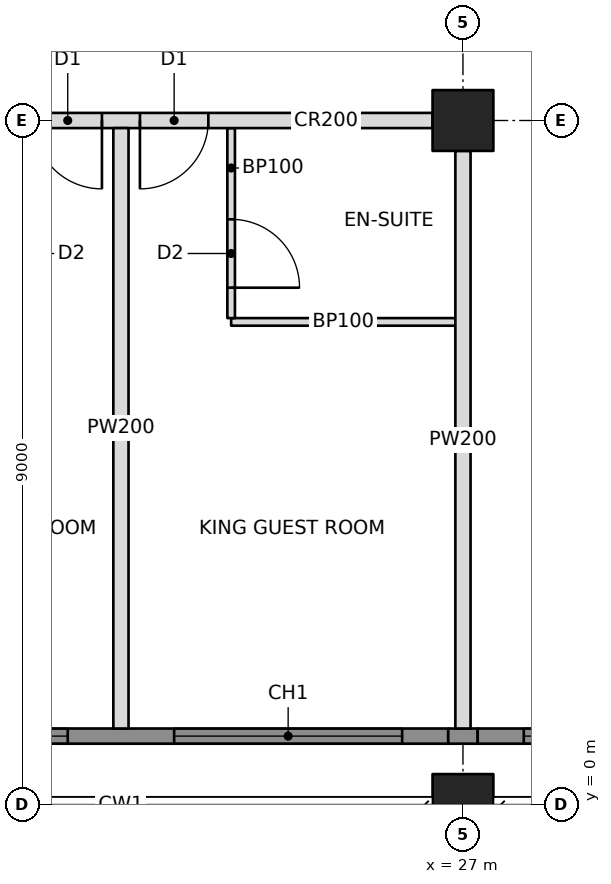
"""IFC4 building model, lengths in metres.
Left out: names, types, materials, properties, quantities, classifications, styles, units other than length and angle.
Written with IfcOpenShell. Run it as: python <this file> out.ifc"""

import sys

from ifc_helpers import new_model, si_unit, direction, frame, frame_2d, origin, origin_2d, place, context, subcontext, project, spatial, rectangle, hollow_rectangle, extrude, element, fill, save


model = new_model("IFC4")
c1 = context("Model", 3, precision=1e-05, world=origin(), true_north=direction((0.0, 1.0)))
c2 = subcontext(c1, "Body", "Model", "MODEL_VIEW")
j1 = project(units=[si_unit("LENGTHUNIT", "METRE"), si_unit("PLANEANGLEUNIT", "RADIAN")], contexts=[c1])
p1 = place(None, origin())
s1 = spatial("IfcSite", under=j1, at=p1, CompositionType="ELEMENT")
p2 = place(p1, origin())
s2 = spatial("IfcBuilding", under=s1, at=p2, CompositionType="ELEMENT")
p3 = place(p2, frame((0.0, 0.0, 170.6)))
s3 = spatial("IfcBuildingStorey", under=s2, at=p3, CompositionType="ELEMENT", Elevation=170.6)
p4 = place(p3, frame((27.0, 0.0, 0.0), z_axis=(0.0, 0.0, 1.0), x_axis=(1.0, 0.0, 0.0)))
e1 = element("IfcColumn", 1, at=p4, inside=s3, PredefinedType="COLUMN", context=c2, shape_type="SweptSolid", body=[
    extrude(hollow_rectangle(XDim=0.8, YDim=0.8, WallThickness=0.07, at=origin_2d()), origin(), (0.0, 0.0, 1.0), 3.4),
])
p5 = place(p3, frame((27.0, 9.0, 0.0), z_axis=(0.0, 0.0, 1.0), x_axis=(1.0, 0.0, 0.0)))
e2 = element("IfcColumn", 2, at=p5, inside=s3, PredefinedType="COLUMN", context=c2, shape_type="SweptSolid", body=[
    extrude(hollow_rectangle(XDim=0.8, YDim=0.8, WallThickness=0.06, at=origin_2d()), origin(), (0.0, 0.0, 1.0), 3.4),
])
p6 = place(p3, frame((18.4, 9.0, 0.0), z_axis=(0.0, 0.0, 1.0), x_axis=(1.0, 0.0, 0.0)))
e3 = element("IfcWall", 3, at=p6, inside=s3, PredefinedType="PARTITIONING", context=c2, shape_type="SweptSolid", body=[
    extrude(rectangle(XDim=8.2, YDim=0.2, at=frame_2d((4.1, 0.0))), origin(), (0.0, 0.0, 1.0), 2.405),
])
p7 = place(p6, frame((2.95, 0.0, 0.0)))
e4 = element("IfcOpeningElement", 4, at=p7, cuts=e3, PredefinedType="OPENING", context=c2, shape_type="SweptSolid", body=[
    extrude(rectangle(XDim=0.9, YDim=2.1, at=frame_2d((0.45, 1.05))), frame((0.0, 0.11, 0.0), z_axis=(0.0, -1.0, 0.0), x_axis=(1.0, 0.0, 0.0)), (0.0, 0.0, 1.0), 0.22),
])
p8 = place(p6, frame((4.35, 0.0, 0.0)))
e5 = element("IfcOpeningElement", 5, at=p8, cuts=e3, PredefinedType="OPENING", context=c2, shape_type="SweptSolid", body=[
    extrude(rectangle(XDim=0.9, YDim=2.1, at=frame_2d((0.45, 1.05))), frame((0.0, 0.11, 0.0), z_axis=(0.0, -1.0, 0.0), x_axis=(1.0, 0.0, 0.0)), (0.0, 0.0, 1.0), 0.22),
])
p9 = place(p3, frame((22.5, 8.9, 0.0), z_axis=(0.0, 0.0, 1.0), x_axis=(0.0, -1.0, 0.0)))
e6 = element("IfcWall", 6, at=p9, inside=s3, PredefinedType="PARTITIONING", context=c2, shape_type="SweptSolid", body=[
    extrude(rectangle(XDim=7.9, YDim=0.2, at=frame_2d((3.95, 0.0))), origin(), (0.0, 0.0, 1.0), 2.404),
])
p10 = place(p3, frame((27.0, 8.6, 0.0), z_axis=(0.0, 0.0, 1.0), x_axis=(0.0, -1.0, 0.0)))
e7 = element("IfcWall", 7, at=p10, inside=s3, PredefinedType="PARTITIONING", context=c2, shape_type="SweptSolid", body=[
    extrude(rectangle(XDim=7.6, YDim=0.2, at=frame_2d((3.8, 0.0))), origin(), (0.0, 0.0, 1.0), 2.405),
])
p11 = place(p3, frame((23.95, 6.35, 0.0), z_axis=(0.0, 0.0, 1.0), x_axis=(1.0, 0.0, 0.0)))
e8 = element("IfcWall", 8, at=p11, inside=s3, PredefinedType="PARTITIONING", context=c2, shape_type="SweptSolid", body=[
    extrude(rectangle(XDim=2.95, YDim=0.1, at=frame_2d((1.475, 0.0))), origin(), (0.0, 0.0, 1.0), 2.404),
])
p12 = place(p3, frame((23.95, 8.9, 0.0), z_axis=(0.0, 0.0, 1.0), x_axis=(0.0, -1.0, 0.0)))
e9 = element("IfcWall", 9, at=p12, inside=s3, PredefinedType="PARTITIONING", context=c2, shape_type="SweptSolid", body=[
    extrude(rectangle(XDim=2.5, YDim=0.1, at=frame_2d((1.25, 0.0))), origin(), (0.0, 0.0, 1.0), 2.404),
])
p13 = place(p12, frame((1.2, 0.0, 0.0)))
e10 = element("IfcOpeningElement", 10, at=p13, cuts=e9, PredefinedType="OPENING", context=c2, shape_type="SweptSolid", body=[
    extrude(rectangle(XDim=0.9, YDim=2.1, at=frame_2d((0.45, 1.05))), frame((0.0, 0.06, 0.0), z_axis=(0.0, -1.0, 0.0), x_axis=(1.0, 0.0, 0.0)), (0.0, 0.0, 1.0), 0.12),
])
p14 = place(p3, frame((18.194, 0.9, 0.0), z_axis=(0.0, 0.0, 1.0), x_axis=(1.0, 0.0, 0.0)))
e11 = element("IfcWall", 11, at=p14, inside=s3, PredefinedType="SOLIDWALL", context=c2, shape_type="SweptSolid", body=[
    extrude(rectangle(XDim=8.612, YDim=0.2, at=frame_2d((4.306, 0.0))), origin(), (0.0, 0.0, 1.0), 3.2),
])
p15 = place(p14, frame((0.606, 0.0, 0.6)))
e12 = element("IfcOpeningElement", 12, at=p15, cuts=e11, PredefinedType="OPENING", context=c2, shape_type="SweptSolid", body=[
    extrude(rectangle(XDim=3.0, YDim=2.2, at=frame_2d((1.5, 1.1))), frame((0.0, 0.11, 0.0), z_axis=(0.0, -1.0, 0.0), x_axis=(1.0, 0.0, 0.0)), (0.0, 0.0, 1.0), 0.22),
])
p16 = place(p14, frame((5.006, 0.0, 0.6)))
e13 = element("IfcOpeningElement", 13, at=p16, cuts=e11, PredefinedType="OPENING", context=c2, shape_type="SweptSolid", body=[
    extrude(rectangle(XDim=3.0, YDim=2.2, at=frame_2d((1.5, 1.1))), frame((0.0, 0.11, 0.0), z_axis=(0.0, -1.0, 0.0), x_axis=(1.0, 0.0, 0.0)), (0.0, 0.0, 1.0), 0.22),
])
p17 = place(p3, frame((26.806, 0.9, 0.0), z_axis=(0.0, 0.0, 1.0), x_axis=(1.0, 0.0, 0.0)))
e14 = element("IfcWall", 14, at=p17, inside=s3, PredefinedType="SOLIDWALL", context=c2, shape_type="SweptSolid", body=[
    extrude(rectangle(XDim=0.388, YDim=0.2, at=frame_2d((0.194, 0.0))), origin(), (0.0, 0.0, 1.0), 2.404),
])
p18 = place(p3, frame((27.194, 0.9, 0.0), z_axis=(0.0, 0.0, 1.0), x_axis=(1.0, 0.0, 0.0)))
e15 = element("IfcWall", 15, at=p18, inside=s3, PredefinedType="SOLIDWALL", context=c2, shape_type="SweptSolid", body=[
    extrude(rectangle(XDim=8.671, YDim=0.2, at=frame_2d((4.335, 0.0))), origin(), (0.0, 0.0, 1.0), 3.2),
])
p19 = place(p18, frame((0.606, 0.0, 0.6)))
e16 = element("IfcOpeningElement", 16, at=p19, cuts=e15, PredefinedType="OPENING", context=c2, shape_type="SweptSolid", body=[
    extrude(rectangle(XDim=3.0, YDim=2.2, at=frame_2d((1.5, 1.1))), frame((0.0, 0.11, 0.0), z_axis=(0.0, -1.0, 0.0), x_axis=(1.0, 0.0, 0.0)), (0.0, 0.0, 1.0), 0.22),
])
p20 = place(p18, frame((5.006, 0.0, 0.6)))
e17 = element("IfcOpeningElement", 17, at=p20, cuts=e15, PredefinedType="OPENING", context=c2, shape_type="SweptSolid", body=[
    extrude(rectangle(XDim=3.0, YDim=2.2, at=frame_2d((1.5, 1.1))), frame((0.0, 0.11, 0.0), z_axis=(0.0, -1.0, 0.0), x_axis=(1.0, 0.0, 0.0)), (0.0, 0.0, 1.0), 0.22),
])
p21 = place(p15, origin())
e18 = element("IfcWindow", 18, at=p21, inside=s3, PartitioningType="TRIPLE_PANEL_VERTICAL", PredefinedType="WINDOW", context=c2, shape_type="SweptSolid", body=[
    extrude(rectangle(XDim=3.0, YDim=2.2, at=frame_2d((1.5, 1.1))), frame((0.0, 0.03, 0.0), z_axis=(0.0, -1.0, 0.0), x_axis=(1.0, 0.0, 0.0)), (0.0, 0.0, 1.0), 0.06),
])
fill(e12, e18)
p22 = place(p16, origin())
e19 = element("IfcWindow", 19, at=p22, inside=s3, PartitioningType="TRIPLE_PANEL_VERTICAL", PredefinedType="WINDOW", context=c2, shape_type="SweptSolid", body=[
    extrude(rectangle(XDim=3.0, YDim=2.2, at=frame_2d((1.5, 1.1))), frame((0.0, 0.03, 0.0), z_axis=(0.0, -1.0, 0.0), x_axis=(1.0, 0.0, 0.0)), (0.0, 0.0, 1.0), 0.06),
])
fill(e13, e19)
p23 = place(p19, origin())
e20 = element("IfcWindow", 20, at=p23, inside=s3, PartitioningType="TRIPLE_PANEL_VERTICAL", PredefinedType="WINDOW", context=c2, shape_type="SweptSolid", body=[
    extrude(rectangle(XDim=3.0, YDim=2.2, at=frame_2d((1.5, 1.1))), frame((0.0, 0.03, 0.0), z_axis=(0.0, -1.0, 0.0), x_axis=(1.0, 0.0, 0.0)), (0.0, 0.0, 1.0), 0.06),
])
fill(e16, e20)
p24 = place(p7, frame((0.9, 0.0, 0.0), z_axis=(0.0, 0.0, 1.0), x_axis=(-1.0, 0.0, 0.0)))
e21 = element("IfcDoor", 21, at=p24, inside=s3, OperationType="SINGLE_SWING_LEFT", PredefinedType="DOOR", context=c2, shape_type="SweptSolid", body=[
    extrude(rectangle(XDim=0.9, YDim=2.1, at=frame_2d((0.45, 1.05))), frame((0.0, 0.025, 0.0), z_axis=(0.0, -1.0, 0.0), x_axis=(1.0, 0.0, 0.0)), (0.0, 0.0, 1.0), 0.05),
])
fill(e4, e21)
p25 = place(p13, origin())
e22 = element("IfcDoor", 22, at=p25, inside=s3, OperationType="SINGLE_SWING_RIGHT", PredefinedType="DOOR", context=c2, shape_type="SweptSolid", body=[
    extrude(rectangle(XDim=0.9, YDim=2.1, at=frame_2d((0.45, 1.05))), frame((0.0, 0.025, 0.0), z_axis=(0.0, -1.0, 0.0), x_axis=(1.0, 0.0, 0.0)), (0.0, 0.0, 1.0), 0.05),
])
fill(e10, e22)
p26 = place(p8, frame((0.9, 0.0, 0.0), z_axis=(0.0, 0.0, 1.0), x_axis=(-1.0, 0.0, 0.0)))
e23 = element("IfcDoor", 23, at=p26, inside=s3, OperationType="SINGLE_SWING_RIGHT", PredefinedType="DOOR", context=c2, shape_type="SweptSolid", body=[
    extrude(rectangle(XDim=0.9, YDim=2.1, at=frame_2d((0.45, 1.05))), frame((0.0, 0.025, 0.0), z_axis=(0.0, -1.0, 0.0), x_axis=(1.0, 0.0, 0.0)), (0.0, 0.0, 1.0), 0.05),
])
fill(e5, e23)
save(model, sys.argv[1])
